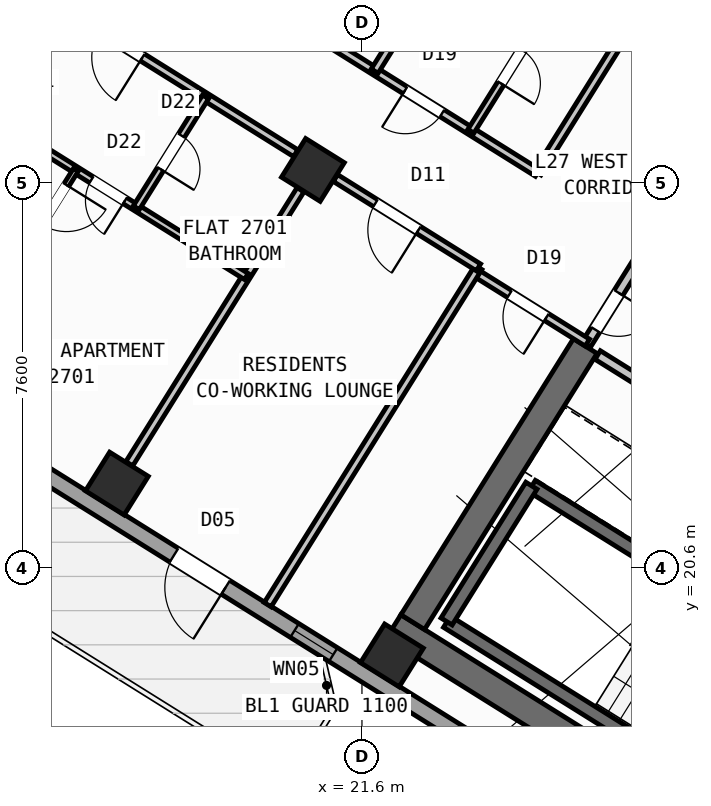
"""IFC4 building model, lengths in metres.
Left out: names, types, materials, properties, quantities, classifications, styles, units other than length and angle.
Written with IfcOpenShell. Run it as: python <this file> out.ifc"""

import sys

from ifc_helpers import new_model, si_unit, direction, frame, frame_2d, origin, origin_2d, place, context, subcontext, project, spatial, rectangle, hollow_rectangle, extrude, source, transform, mapped, element, fill, save


model = new_model("IFC4")
c1 = context("Model", 3, precision=1e-05, world=origin(), true_north=direction((0.0, 1.0)))
c2 = subcontext(c1, "Body", "Model", "MODEL_VIEW")
j1 = project(units=[si_unit("LENGTHUNIT", "METRE"), si_unit("PLANEANGLEUNIT", "RADIAN")], contexts=[c1])
p1 = place(None, origin())
s1 = spatial("IfcSite", under=j1, at=p1, CompositionType="ELEMENT")
p2 = place(p1, origin())
s2 = spatial("IfcBuilding", under=s1, at=p2, CompositionType="ELEMENT")
p3 = place(p2, frame((0.0, 0.0, 108.9)))
s3 = spatial("IfcBuildingStorey", under=s2, at=p3, CompositionType="ELEMENT", Elevation=108.9)
p4 = place(p3, frame((33.366, 12.477, 0.0), z_axis=(0.0, 0.0, 1.0), x_axis=(-0.848047359947, 0.529920442413, 0.0)))
e1 = element("IfcWall", 1, at=p4, inside=s3, PredefinedType="SHEAR", context=c2, shape_type="SweptSolid", body=[
    extrude(rectangle(XDim=13.14, YDim=0.55, at=frame_2d((6.57, 0.0))), origin(), (0.0, 0.0, 1.0), 3.35),
])
p5 = place(p3, frame((26.007, 24.976, 0.0), z_axis=(0.0, 0.0, 1.0), x_axis=(-0.529923795287, -0.848045264823, 0.0)))
e2 = element("IfcWall", 2, at=p5, inside=s3, PredefinedType="SHEAR", context=c2, shape_type="SweptSolid", body=[
    extrude(rectangle(XDim=6.425, YDim=0.55, at=frame_2d((3.212, 0.0))), origin(), (0.0, 0.0, 1.0), 3.35),
])
m1 = source(origin(), c2, "Body", "SweptSolid", [
    extrude(hollow_rectangle(XDim=0.9, YDim=0.9, WallThickness=0.036, at=origin_2d()), origin(), (0.0, 0.0, 1.0), 3.6),
])
for number, where, z_axis, x_axis in (
    (3, (22.191, 18.87, 0.0), (0.0, 0.0, 1.0), (-0.848, 0.53, 0.0)),
    (4, (20.632, 28.452, 0.0), (0.0, 0.0, 1.0), (-0.848, 0.53, 0.0)),
    (5, (16.764, 22.261, 0.0), (0.0, 0.0, 1.0), (-0.848, 0.53, 0.0)),
):
    element("IfcColumn", number, at=place(p3, frame(where, z_axis=z_axis, x_axis=x_axis)), inside=s3, PredefinedType="COLUMN", context=c2, shape_type="MappedRepresentation", body=[
        mapped(m1, transform((0.0, 0.0, 0.0), scale=1.0)),
    ])
p6 = place(p3, frame((31.76, 12.183, 0.0), z_axis=(0.0, 0.0, 1.0), x_axis=(-0.848047074256, 0.529920899612, 0.0)))
e6 = element("IfcWall", 6, at=p6, inside=s3, PredefinedType="STANDARD", context=c2, shape_type="SweptSolid", body=[
    extrude(rectangle(XDim=30.652, YDim=0.32, at=frame_2d((15.326, 0.0))), origin(), (0.0, 0.0, 1.0), 3.35),
])
p7 = place(p6, frame((15.153, 0.0, 0.0)))
e7 = element("IfcOpeningElement", 7, at=p7, cuts=e6, PredefinedType="OPENING", context=c2, shape_type="SweptSolid", body=[
    extrude(rectangle(XDim=1.2, YDim=2.15, at=frame_2d((0.6, 1.075))), frame((0.0, 0.17, 0.0), z_axis=(0.0, -1.0, 0.0), x_axis=(1.0, 0.0, 0.0)), (0.0, 0.0, 1.0), 0.34),
])
p8 = place(p6, frame((2.002, 0.0, 0.8)))
e8 = element("IfcOpeningElement", 8, at=p8, cuts=e6, PredefinedType="OPENING", context=c2, shape_type="SweptSolid", body=[
    extrude(rectangle(XDim=2.1, YDim=1.55, at=frame_2d((1.05, 0.775))), frame((0.0, 0.17, 0.0), z_axis=(0.0, -1.0, 0.0), x_axis=(1.0, 0.0, 0.0)), (0.0, 0.0, 1.0), 0.34),
])
p9 = place(p6, frame((7.206, 0.0, 0.8)))
e9 = element("IfcOpeningElement", 9, at=p9, cuts=e6, PredefinedType="OPENING", context=c2, shape_type="SweptSolid", body=[
    extrude(rectangle(XDim=2.1, YDim=1.55, at=frame_2d((1.05, 0.775))), frame((0.0, 0.17, 0.0), z_axis=(0.0, -1.0, 0.0), x_axis=(1.0, 0.0, 0.0)), (0.0, 0.0, 1.0), 0.34),
])
p10 = place(p6, frame((12.648, 0.0, 1.0)))
e10 = element("IfcOpeningElement", 10, at=p10, cuts=e6, PredefinedType="OPENING", context=c2, shape_type="SweptSolid", body=[
    extrude(rectangle(XDim=0.9, YDim=1.25, at=frame_2d((0.45, 0.625))), frame((0.0, 0.17, 0.0), z_axis=(0.0, -1.0, 0.0), x_axis=(1.0, 0.0, 0.0)), (0.0, 0.0, 1.0), 0.34),
])
p11 = place(p6, frame((19.59, 0.0, 0.95)))
e11 = element("IfcOpeningElement", 11, at=p11, cuts=e6, PredefinedType="OPENING", context=c2, shape_type="SweptSolid", body=[
    extrude(rectangle(XDim=1.2, YDim=1.4, at=frame_2d((0.6, 0.7))), frame((0.0, 0.17, 0.0), z_axis=(0.0, -1.0, 0.0), x_axis=(1.0, 0.0, 0.0)), (0.0, 0.0, 1.0), 0.34),
])
p12 = place(p6, frame((25.966, 0.0, 1.0)))
e12 = element("IfcOpeningElement", 12, at=p12, cuts=e6, PredefinedType="OPENING", context=c2, shape_type="SweptSolid", body=[
    extrude(rectangle(XDim=0.9, YDim=1.25, at=frame_2d((0.45, 0.625))), frame((0.0, 0.17, 0.0), z_axis=(0.0, -1.0, 0.0), x_axis=(1.0, 0.0, 0.0)), (0.0, 0.0, 1.0), 0.34),
])
p13 = place(p6, frame((28.871, 0.0, 1.0)))
e13 = element("IfcOpeningElement", 13, at=p13, cuts=e6, PredefinedType="OPENING", context=c2, shape_type="SweptSolid", body=[
    extrude(rectangle(XDim=0.9, YDim=1.25, at=frame_2d((0.45, 0.625))), frame((0.0, 0.17, 0.0), z_axis=(0.0, -1.0, 0.0), x_axis=(1.0, 0.0, 0.0)), (0.0, 0.0, 1.0), 0.34),
])
p14 = place(p3, frame((5.7, 28.71, 0.0), z_axis=(0.0, 0.0, 1.0), x_axis=(0.529923711467, 0.8480453172, 0.0)))
e14 = element("IfcWall", 14, at=p14, inside=s3, PredefinedType="STANDARD", context=c2, shape_type="SweptSolid", body=[
    extrude(rectangle(XDim=21.587, YDim=0.32, at=frame_2d((10.794, 0.0))), origin(), (0.0, 0.0, 1.0), 2.775),
])
p15 = place(p14, frame((1.984, 0.0, 0.8)))
e15 = element("IfcOpeningElement", 15, at=p15, cuts=e14, PredefinedType="OPENING", context=c2, shape_type="SweptSolid", body=[
    extrude(rectangle(XDim=2.1, YDim=1.55, at=frame_2d((1.05, 0.775))), frame((0.0, 0.17, 0.0), z_axis=(0.0, -1.0, 0.0), x_axis=(1.0, 0.0, 0.0)), (0.0, 0.0, 1.0), 0.34),
])
p16 = place(p14, frame((11.459, 0.0, 0.85)))
e16 = element("IfcOpeningElement", 16, at=p16, cuts=e14, PredefinedType="OPENING", context=c2, shape_type="SweptSolid", body=[
    extrude(rectangle(XDim=1.8, YDim=1.5, at=frame_2d((0.9, 0.75))), frame((0.0, 0.17, 0.0), z_axis=(0.0, -1.0, 0.0), x_axis=(1.0, 0.0, 0.0)), (0.0, 0.0, 1.0), 0.34),
])
p17 = place(p14, frame((18.335, 0.0, 0.85)))
e17 = element("IfcOpeningElement", 17, at=p17, cuts=e14, PredefinedType="OPENING", context=c2, shape_type="SweptSolid", body=[
    extrude(rectangle(XDim=1.5, YDim=1.5, at=frame_2d((0.75, 0.75))), frame((0.0, 0.17, 0.0), z_axis=(0.0, -1.0, 0.0), x_axis=(1.0, 0.0, 0.0)), (0.0, 0.0, 1.0), 0.34),
])
p18 = place(p3, frame((29.605, 15.581, 0.0), z_axis=(0.0, 0.0, 1.0), x_axis=(-0.848036911448, 0.529937163087, 0.0)))
e18 = element("IfcWall", 18, at=p18, inside=s3, PredefinedType="SHEAR", context=c2, shape_type="SweptSolid", body=[
    extrude(rectangle(XDim=7.46, YDim=0.26, at=frame_2d((3.73, 0.0))), origin(), (0.0, 0.0, 1.0), 3.35),
])
p19 = place(p3, frame((31.28, 18.261, 0.0), z_axis=(0.0, 0.0, 1.0), x_axis=(-0.848051618787, 0.529913626805, 0.0)))
e19 = element("IfcWall", 19, at=p19, inside=s3, PredefinedType="SHEAR", context=c2, shape_type="SweptSolid", body=[
    extrude(rectangle(XDim=7.46, YDim=0.26, at=frame_2d((3.73, 0.0))), origin(), (0.0, 0.0, 1.0), 3.35),
])
p20 = place(p19, frame((0.36, 0.0, 0.0)))
e20 = element("IfcOpeningElement", 20, at=p20, cuts=e19, PredefinedType="OPENING", context=c2, shape_type="SweptSolid", body=[
    extrude(rectangle(XDim=0.86, YDim=2.05, at=frame_2d((0.43, 1.025))), frame((0.0, 0.14, 0.0), z_axis=(0.0, -1.0, 0.0), x_axis=(1.0, 0.0, 0.0)), (0.0, 0.0, 1.0), 0.28),
])
p21 = place(p3, frame((24.945, 22.22, 0.0), z_axis=(0.0, 0.0, 1.0), x_axis=(-0.529908658664, -0.84805472316, 0.0)))
e21 = element("IfcWall", 21, at=p21, inside=s3, PredefinedType="SHEAR", context=c2, shape_type="SweptSolid", body=[
    extrude(rectangle(XDim=3.16, YDim=0.26, at=frame_2d((1.58, 0.0))), origin(), (0.0, 0.0, 1.0), 3.35),
])
p22 = place(p3, frame((31.525, 21.504, 0.0), z_axis=(0.0, 0.0, 1.0), x_axis=(-0.848040211232, 0.529931882541, 0.0)))
e22 = element("IfcWall", 22, at=p22, inside=s3, PredefinedType="STANDARD", context=c2, shape_type="SweptSolid", body=[
    extrude(rectangle(XDim=6.218, YDim=0.2, at=frame_2d((3.109, 0.0))), origin(), (0.0, 0.0, 1.0), 3.34),
])
p23 = place(p22, frame((4.4, 0.0, 0.0)))
e23 = element("IfcOpeningElement", 23, at=p23, cuts=e22, PredefinedType="OPENING", context=c2, shape_type="SweptSolid", body=[
    extrude(rectangle(XDim=0.86, YDim=2.05, at=frame_2d((0.43, 1.025))), frame((0.0, 0.11, 0.0), z_axis=(0.0, -1.0, 0.0), x_axis=(1.0, 0.0, 0.0)), (0.0, 0.0, 1.0), 0.22),
])
p24 = place(p22, frame((0.35, 0.0, 0.0)))
e24 = element("IfcOpeningElement", 24, at=p24, cuts=e22, PredefinedType="OPENING", context=c2, shape_type="SweptSolid", body=[
    extrude(rectangle(XDim=0.86, YDim=2.05, at=frame_2d((0.43, 1.025))), frame((0.0, 0.11, 0.0), z_axis=(0.0, -1.0, 0.0), x_axis=(1.0, 0.0, 0.0)), (0.0, 0.0, 1.0), 0.22),
])
p25 = place(p3, frame((27.596, 27.52, 0.0), z_axis=(0.0, 0.0, 1.0), x_axis=(-0.529865479138, -0.848081702443, 0.0)))
e25 = element("IfcWall", 25, at=p25, inside=s3, PredefinedType="STANDARD", context=c2, shape_type="SweptSolid", body=[
    extrude(rectangle(XDim=2.96, YDim=0.2, at=frame_2d((1.48, 0.0))), origin(), (0.0, 0.0, 1.0), 3.34),
])
p26 = place(p25, frame((1.76, 0.0, 0.0)))
e26 = element("IfcOpeningElement", 26, at=p26, cuts=e25, PredefinedType="OPENING", context=c2, shape_type="SweptSolid", body=[
    extrude(rectangle(XDim=0.86, YDim=2.05, at=frame_2d((0.43, 1.025))), frame((0.0, 0.11, 0.0), z_axis=(0.0, -1.0, 0.0), x_axis=(1.0, 0.0, 0.0)), (0.0, 0.0, 1.0), 0.22),
])
p27 = place(p3, frame((26.049, 25.044, 0.0), z_axis=(0.0, 0.0, 1.0), x_axis=(-0.848050851465, 0.529914854792, 0.0)))
e27 = element("IfcWall", 27, at=p27, inside=s3, PredefinedType="PARTITIONING", context=c2, shape_type="SweptSolid", body=[
    extrude(rectangle(XDim=2.61, YDim=0.16, at=frame_2d((1.305, 0.0))), origin(), (0.0, 0.0, 1.0), 2.775),
])
p28 = place(p27, frame((0.95, 0.0, 0.0)))
e28 = element("IfcOpeningElement", 28, at=p28, cuts=e27, PredefinedType="OPENING", context=c2, shape_type="SweptSolid", body=[
    extrude(rectangle(XDim=0.86, YDim=2.05, at=frame_2d((0.43, 1.025))), frame((0.0, 0.09, 0.0), z_axis=(0.0, -1.0, 0.0), x_axis=(1.0, 0.0, 0.0)), (0.0, 0.0, 1.0), 0.18),
])
p29 = place(p3, frame((31.239, 38.274, 0.0), z_axis=(0.0, 0.0, 1.0), x_axis=(-0.529925472745, -0.848044216616, 0.0)))
e29 = element("IfcWall", 29, at=p29, inside=s3, PredefinedType="PARTITIONING", context=c2, shape_type="SweptSolid", body=[
    extrude(rectangle(XDim=11.65, YDim=0.16, at=frame_2d((5.825, 0.0))), origin(), (0.0, 0.0, 1.0), 3.34),
])
p30 = place(p3, frame((23.899, 26.529, 0.0), z_axis=(0.0, 0.0, 1.0), x_axis=(-0.529920662441, -0.848047222457, 0.0)))
e30 = element("IfcWall", 30, at=p30, inside=s3, PredefinedType="PARTITIONING", context=c2, shape_type="SweptSolid", body=[
    extrude(rectangle(XDim=7.85, YDim=0.16, at=frame_2d((3.925, 0.0))), origin(), (0.0, 0.0, 1.0), 3.34),
])
p31 = place(p3, frame((25.065, 28.394, 0.0), z_axis=(0.0, 0.0, 1.0), x_axis=(-0.848048310262, 0.529918921593, 0.0)))
e31 = element("IfcWall", 31, at=p31, inside=s3, PredefinedType="PARTITIONING", context=c2, shape_type="SweptSolid", body=[
    extrude(rectangle(XDim=16.73, YDim=0.16, at=frame_2d((8.365, 0.0))), origin(), (0.0, 0.0, 1.0), 3.34),
])
p32 = place(p31, frame((2.22, 0.0, 0.0)))
e32 = element("IfcOpeningElement", 32, at=p32, cuts=e31, PredefinedType="OPENING", context=c2, shape_type="SweptSolid", body=[
    extrude(rectangle(XDim=0.86, YDim=2.05, at=frame_2d((0.43, 1.025))), frame((0.0, 0.09, 0.0), z_axis=(0.0, -1.0, 0.0), x_axis=(1.0, 0.0, 0.0)), (0.0, 0.0, 1.0), 0.18),
])
p33 = place(p31, frame((7.82, 0.0, 0.0)))
e33 = element("IfcOpeningElement", 33, at=p33, cuts=e31, PredefinedType="OPENING", context=c2, shape_type="SweptSolid", body=[
    extrude(rectangle(XDim=1.0, YDim=2.1, at=frame_2d((0.5, 1.05))), frame((0.0, 0.09, 0.0), z_axis=(0.0, -1.0, 0.0), x_axis=(1.0, 0.0, 0.0)), (0.0, 0.0, 1.0), 0.18),
])
p34 = place(p31, frame((12.95, 0.0, 0.0)))
e34 = element("IfcOpeningElement", 34, at=p34, cuts=e31, PredefinedType="OPENING", context=c2, shape_type="SweptSolid", body=[
    extrude(rectangle(XDim=1.0, YDim=2.1, at=frame_2d((0.5, 1.05))), frame((0.0, 0.09, 0.0), z_axis=(0.0, -1.0, 0.0), x_axis=(1.0, 0.0, 0.0)), (0.0, 0.0, 1.0), 0.18),
])
p35 = place(p3, frame((23.899, 26.529, 0.0), z_axis=(0.0, 0.0, 1.0), x_axis=(-0.848064240775, 0.529893426567, 0.0)))
e35 = element("IfcWall", 35, at=p35, inside=s3, PredefinedType="PARTITIONING", context=c2, shape_type="SweptSolid", body=[
    extrude(rectangle(XDim=3.328, YDim=0.16, at=frame_2d((1.664, 0.0))), origin(), (0.0, 0.0, 1.0), 2.775),
])
p36 = place(p35, frame((1.395, 0.0, 0.0)))
e36 = element("IfcOpeningElement", 36, at=p36, cuts=e35, PredefinedType="OPENING", context=c2, shape_type="SweptSolid", body=[
    extrude(rectangle(XDim=1.0, YDim=2.1, at=frame_2d((0.5, 1.05))), frame((0.0, 0.09, 0.0), z_axis=(0.0, -1.0, 0.0), x_axis=(1.0, 0.0, 0.0)), (0.0, 0.0, 1.0), 0.18),
])
p37 = place(p3, frame((20.293, 28.782, 0.0), z_axis=(0.0, 0.0, 1.0), x_axis=(-0.848040881926, 0.529930809241, 0.0)))
e37 = element("IfcWall", 37, at=p37, inside=s3, PredefinedType="PARTITIONING", context=c2, shape_type="SweptSolid", body=[
    extrude(rectangle(XDim=5.476, YDim=0.16, at=frame_2d((2.738, 0.0))), origin(), (0.0, 0.0, 1.0), 2.775),
])
p38 = place(p37, frame((3.568, 0.0, 0.0)))
e38 = element("IfcOpeningElement", 38, at=p38, cuts=e37, PredefinedType="OPENING", context=c2, shape_type="SweptSolid", body=[
    extrude(rectangle(XDim=1.0, YDim=2.1, at=frame_2d((0.5, 1.05))), frame((0.0, 0.09, 0.0), z_axis=(0.0, -1.0, 0.0), x_axis=(1.0, 0.0, 0.0)), (0.0, 0.0, 1.0), 0.18),
])
p39 = place(p3, frame((20.387, 28.06, 0.0), z_axis=(0.0, 0.0, 1.0), x_axis=(-0.529902564924, -0.848058530814, 0.0)))
e39 = element("IfcWall", 39, at=p39, inside=s3, PredefinedType="PARTITIONING", context=c2, shape_type="SweptSolid", body=[
    extrude(rectangle(XDim=6.376, YDim=0.16, at=frame_2d((3.188, 0.0))), origin(), (0.0, 0.0, 1.0), 2.775),
])
p40 = place(p3, frame((19.318, 26.349, 0.0), z_axis=(0.0, 0.0, 1.0), x_axis=(-0.848039019877, 0.529933789039, 0.0)))
e40 = element("IfcWall", 40, at=p40, inside=s3, PredefinedType="PLUMBINGWALL", context=c2, shape_type="SweptSolid", body=[
    extrude(rectangle(XDim=6.4, YDim=0.14, at=frame_2d((3.2, 0.0))), origin(), (0.0, 0.0, 1.0), 3.34),
])
p41 = place(p40, frame((2.824, 0.0, 0.0)))
e41 = element("IfcOpeningElement", 41, at=p41, cuts=e40, PredefinedType="OPENING", context=c2, shape_type="SweptSolid", body=[
    extrude(rectangle(XDim=0.78, YDim=2.05, at=frame_2d((0.39, 1.025))), frame((0.0, 0.08, 0.0), z_axis=(0.0, -1.0, 0.0), x_axis=(1.0, 0.0, 0.0)), (0.0, 0.0, 1.0), 0.16),
])
p42 = place(p3, frame((18.514, 29.894, 0.0), z_axis=(0.0, 0.0, 1.0), x_axis=(-0.529913878929, -0.848051461244, 0.0)))
e42 = element("IfcWall", 42, at=p42, inside=s3, PredefinedType="PLUMBINGWALL", context=c2, shape_type="SweptSolid", body=[
    extrude(rectangle(XDim=2.58, YDim=0.14, at=frame_2d((1.29, 0.0))), origin(), (0.0, 0.0, 1.0), 3.34),
])
p43 = place(p42, frame((0.9, 0.0, 0.0)))
e43 = element("IfcOpeningElement", 43, at=p43, cuts=e42, PredefinedType="OPENING", context=c2, shape_type="SweptSolid", body=[
    extrude(rectangle(XDim=0.78, YDim=2.05, at=frame_2d((0.39, 1.025))), frame((0.0, 0.08, 0.0), z_axis=(0.0, -1.0, 0.0), x_axis=(1.0, 0.0, 0.0)), (0.0, 0.0, 1.0), 0.16),
])
p44 = place(p3, frame((15.953, 28.452, 0.0), z_axis=(0.0, 0.0, 1.0), x_axis=(-0.529919714018, -0.848047815099, 0.0)))
e44 = element("IfcWall", 44, at=p44, inside=s3, PredefinedType="PARTITIONING", context=c2, shape_type="SweptSolid", body=[
    extrude(rectangle(XDim=5.54, YDim=0.11, at=frame_2d((2.77, 0.0))), origin(), (0.0, 0.0, 1.0), 3.34),
])
p45 = place(p44, frame((0.35, 0.0, 0.0)))
e45 = element("IfcOpeningElement", 45, at=p45, cuts=e44, PredefinedType="OPENING", context=c2, shape_type="SweptSolid", body=[
    extrude(rectangle(XDim=0.92, YDim=2.08, at=frame_2d((0.46, 1.04))), frame((0.0, 0.065, 0.0), z_axis=(0.0, -1.0, 0.0), x_axis=(1.0, 0.0, 0.0)), (0.0, 0.0, 1.0), 0.13),
])
p46 = place(p3, frame((24.256, 34.251, 0.0), z_axis=(0.0, 0.0, 1.0), x_axis=(-0.529926399231, -0.848043637673, 0.0)))
e46 = element("IfcWall", 46, at=p46, inside=s3, PredefinedType="PARTITIONING", context=c2, shape_type="SweptSolid", body=[
    extrude(rectangle(XDim=4.538, YDim=0.16, at=frame_2d((2.269, 0.0))), origin(), (0.0, 0.0, 1.0), 2.775),
])
p47 = place(p3, frame((25.345, 31.768, 0.0), z_axis=(0.0, 0.0, 1.0), x_axis=(-0.529882284462, -0.848071202561, 0.0)))
e47 = element("IfcWall", 47, at=p47, inside=s3, PredefinedType="PLUMBINGWALL", context=c2, shape_type="SweptSolid", body=[
    extrude(rectangle(XDim=3.01, YDim=0.14, at=frame_2d((1.505, 0.0))), origin(), (0.0, 0.0, 1.0), 2.995),
])
p48 = place(p47, frame((1.115, 0.0, 0.0)))
e48 = element("IfcOpeningElement", 48, at=p48, cuts=e47, PredefinedType="OPENING", context=c2, shape_type="SweptSolid", body=[
    extrude(rectangle(XDim=0.78, YDim=2.05, at=frame_2d((0.39, 1.025))), frame((0.0, 0.08, 0.0), z_axis=(0.0, -1.0, 0.0), x_axis=(1.0, 0.0, 0.0)), (0.0, 0.0, 1.0), 0.16),
])
m2 = source(origin(), c2, "Body", "SweptSolid", [
    extrude(rectangle(XDim=1.2, YDim=2.15, at=frame_2d((0.6, 1.075))), frame((0.0, 0.025, 0.0), z_axis=(0.0, -1.0, 0.0), x_axis=(1.0, 0.0, 0.0)), (0.0, 0.0, 1.0), 0.05),
])
p49 = place(p7, origin())
e49 = element("IfcDoor", 49, at=p49, inside=s3, OperationType="SINGLE_SWING_LEFT", PredefinedType="DOOR", context=c2, shape_type="MappedRepresentation", body=[
    mapped(m2, transform((0.0, 0.0, 0.0), scale=1.0)),
])
fill(e7, e49)
m3 = source(origin(), c2, "Body", "SweptSolid", [
    extrude(rectangle(XDim=0.9, YDim=1.25, at=frame_2d((0.45, 0.625))), frame((0.0, 0.03, 0.0), z_axis=(0.0, -1.0, 0.0), x_axis=(1.0, 0.0, 0.0)), (0.0, 0.0, 1.0), 0.06),
])
p50 = place(p10, origin())
e50 = element("IfcWindow", 50, at=p50, inside=s3, PartitioningType="SINGLE_PANEL", PredefinedType="WINDOW", context=c2, shape_type="MappedRepresentation", body=[
    mapped(m3, transform((0.0, 0.0, 0.0), scale=1.0)),
])
fill(e10, e50)
m4 = source(origin(), c2, "Body", "SweptSolid", [
    extrude(rectangle(XDim=0.86, YDim=2.05, at=frame_2d((0.43, 1.025))), frame((0.0, 0.025, 0.0), z_axis=(0.0, -1.0, 0.0), x_axis=(1.0, 0.0, 0.0)), (0.0, 0.0, 1.0), 0.05),
])
p51 = place(p28, origin())
e51 = element("IfcDoor", 51, at=p51, inside=s3, OperationType="SINGLE_SWING_LEFT", PredefinedType="DOOR", context=c2, shape_type="MappedRepresentation", body=[
    mapped(m4, transform((0.0, 0.0, 0.0), scale=1.0)),
])
fill(e28, e51)
p52 = place(p26, origin())
e52 = element("IfcDoor", 52, at=p52, inside=s3, OperationType="SINGLE_SWING_LEFT", PredefinedType="DOOR", context=c2, shape_type="MappedRepresentation", body=[
    mapped(m4, transform((0.0, 0.0, 0.0), scale=1.0)),
])
fill(e26, e52)
m5 = source(origin(), c2, "Body", "SweptSolid", [
    extrude(rectangle(XDim=1.0, YDim=2.1, at=frame_2d((0.5, 1.05))), frame((0.0, 0.025, 0.0), z_axis=(0.0, -1.0, 0.0), x_axis=(1.0, 0.0, 0.0)), (0.0, 0.0, 1.0), 0.05),
])
p53 = place(p36, origin())
e53 = element("IfcDoor", 53, at=p53, inside=s3, OperationType="SINGLE_SWING_LEFT", PredefinedType="DOOR", context=c2, shape_type="MappedRepresentation", body=[
    mapped(m5, transform((0.0, 0.0, 0.0), scale=1.0)),
])
fill(e36, e53)
m6 = source(origin(), c2, "Body", "SweptSolid", [
    extrude(rectangle(XDim=0.92, YDim=2.08, at=frame_2d((0.46, 1.04))), frame((0.0, 0.025, 0.0), z_axis=(0.0, -1.0, 0.0), x_axis=(1.0, 0.0, 0.0)), (0.0, 0.0, 1.0), 0.05),
])
p54 = place(p45, origin())
e54 = element("IfcDoor", 54, at=p54, inside=s3, OperationType="SINGLE_SWING_LEFT", PredefinedType="DOOR", context=c2, shape_type="MappedRepresentation", body=[
    mapped(m6, transform((0.0, 0.0, 0.0), scale=1.0)),
])
fill(e45, e54)
p55 = place(p38, origin())
e55 = element("IfcDoor", 55, at=p55, inside=s3, OperationType="SINGLE_SWING_LEFT", PredefinedType="DOOR", context=c2, shape_type="MappedRepresentation", body=[
    mapped(m5, transform((0.0, 0.0, 0.0), scale=1.0)),
])
fill(e38, e55)
m7 = source(origin(), c2, "Body", "SweptSolid", [
    extrude(rectangle(XDim=0.78, YDim=2.05, at=frame_2d((0.39, 1.025))), frame((0.0, 0.025, 0.0), z_axis=(0.0, -1.0, 0.0), x_axis=(1.0, 0.0, 0.0)), (0.0, 0.0, 1.0), 0.05),
])
p56 = place(p41, origin())
e56 = element("IfcDoor", 56, at=p56, inside=s3, OperationType="SINGLE_SWING_LEFT", PredefinedType="DOOR", context=c2, shape_type="MappedRepresentation", body=[
    mapped(m7, transform((0.0, 0.0, 0.0), scale=1.0)),
])
fill(e41, e56)
p57 = place(p43, origin())
e57 = element("IfcDoor", 57, at=p57, inside=s3, OperationType="SINGLE_SWING_RIGHT", PredefinedType="DOOR", context=c2, shape_type="MappedRepresentation", body=[
    mapped(m7, transform((0.0, 0.0, 0.0), scale=1.0)),
])
fill(e43, e57)
p58 = place(p32, origin())
e58 = element("IfcDoor", 58, at=p58, inside=s3, OperationType="SINGLE_SWING_RIGHT", PredefinedType="DOOR", context=c2, shape_type="MappedRepresentation", body=[
    mapped(m4, transform((0.0, 0.0, 0.0), scale=1.0)),
])
fill(e32, e58)
p59 = place(p48, origin())
e59 = element("IfcDoor", 59, at=p59, inside=s3, OperationType="SINGLE_SWING_RIGHT", PredefinedType="DOOR", context=c2, shape_type="MappedRepresentation", body=[
    mapped(m7, transform((0.0, 0.0, 0.0), scale=1.0)),
])
fill(e48, e59)
save(model, sys.argv[1])
